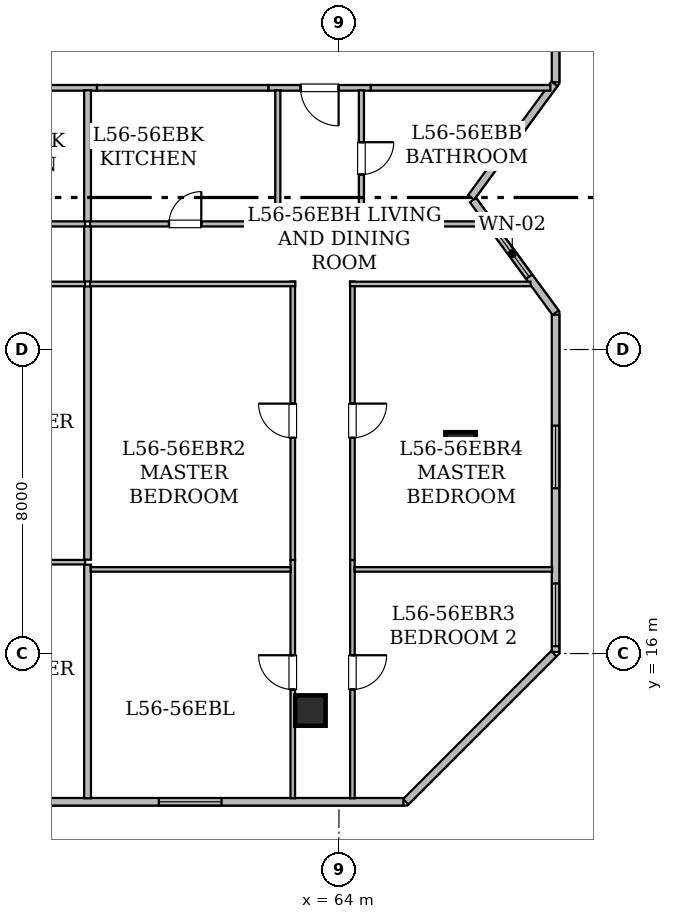
"""IFC4 building model, lengths in metres.
Left out: names, types, materials, properties, quantities, classifications, styles, units other than length and angle.
Written with IfcOpenShell. Run it as: python <this file> out.ifc"""

import sys

from ifc_helpers import new_model, si_unit, direction, frame, frame_2d, origin, origin_2d, place, context, subcontext, project, spatial, rectangle, hollow_rectangle, extrude, element, fill, save


model = new_model("IFC4")
c1 = context("Model", 3, precision=1e-05, world=origin(), true_north=direction((0.0, 1.0)))
c2 = subcontext(c1, "Body", "Model", "MODEL_VIEW")
j1 = project(units=[si_unit("LENGTHUNIT", "METRE"), si_unit("PLANEANGLEUNIT", "RADIAN")], contexts=[c1])
p1 = place(None, origin())
s1 = spatial("IfcSite", under=j1, at=p1, CompositionType="ELEMENT")
p2 = place(p1, origin())
s2 = spatial("IfcBuilding", under=s1, at=p2, CompositionType="ELEMENT")
p3 = place(p2, frame((0.0, 0.0, 220.85)))
s3 = spatial("IfcBuildingStorey", under=s2, at=p3, CompositionType="ELEMENT", Elevation=220.85)
for number, where, z_axis, x_axis in (
    (1, (63.25, 14.5, 0.0), (0.0, 0.0, 1.0), (1.0, 0.0, 0.0)),
    (2, (67.2, 21.425, 0.0), (0.0, 0.0, 1.0), (1.0, 0.0, 0.0)),
):
    element("IfcColumn", number, at=place(p3, frame(where, z_axis=z_axis, x_axis=x_axis)), inside=s3, PredefinedType="COLUMN", context=c2, shape_type="SweptSolid", body=[
        extrude(hollow_rectangle(XDim=0.8, YDim=0.8, WallThickness=0.04, at=origin_2d()), origin(), (0.0, 0.0, 1.0), 3.65),
    ])
p4 = place(p3, frame((69.7, 39.896, 0.0), z_axis=(0.0, 0.0, 1.0), x_axis=(0.0, -1.0, 0.0)))
e3 = element("IfcWall", 3, at=p4, inside=s3, PredefinedType="STANDARD", context=c2, shape_type="SweptSolid", body=[
    extrude(rectangle(XDim=8.863, YDim=0.2, at=frame_2d((4.432, 0.0))), origin(), (0.0, 0.0, 1.0), 3.43),
])
p5 = place(p4, frame((4.641, 0.0, 0.85)))
e4 = element("IfcOpeningElement", 4, at=p5, cuts=e3, PredefinedType="OPENING", context=c2, shape_type="SweptSolid", body=[
    extrude(rectangle(XDim=1.65, YDim=1.55, at=frame_2d((0.825, 0.775))), frame((0.0, 0.11, 0.0), z_axis=(0.0, -1.0, 0.0), x_axis=(1.0, 0.0, 0.0)), (0.0, 0.0, 1.0), 0.22),
])
p6 = place(p4, frame((2.811, 0.0, 0.8)))
e5 = element("IfcOpeningElement", 5, at=p6, cuts=e3, PredefinedType="OPENING", context=c2, shape_type="SweptSolid", body=[
    extrude(rectangle(XDim=1.2, YDim=1.5, at=frame_2d((0.6, 0.75))), frame((0.0, 0.11, 0.0), z_axis=(0.0, -1.0, 0.0), x_axis=(1.0, 0.0, 0.0)), (0.0, 0.0, 1.0), 0.22),
])
p7 = place(p4, frame((0.628, 0.0, 0.85)))
e6 = element("IfcOpeningElement", 6, at=p7, cuts=e3, PredefinedType="OPENING", context=c2, shape_type="SweptSolid", body=[
    extrude(rectangle(XDim=1.65, YDim=1.55, at=frame_2d((0.825, 0.775))), frame((0.0, 0.11, 0.0), z_axis=(0.0, -1.0, 0.0), x_axis=(1.0, 0.0, 0.0)), (0.0, 0.0, 1.0), 0.22),
])
p8 = place(p3, frame((69.67, 30.992, 0.0), z_axis=(0.0, 0.0, 1.0), x_axis=(-0.591320870733, -0.806436375566, 0.0)))
e7 = element("IfcWall", 7, at=p8, inside=s3, PredefinedType="STANDARD", context=c2, shape_type="SweptSolid", body=[
    extrude(rectangle(XDim=3.71, YDim=0.2, at=frame_2d((1.855, 0.0))), origin(), (0.0, 0.0, 1.0), 3.43),
])
p9 = place(p3, frame((67.527, 27.931, 0.0), z_axis=(0.0, 0.0, 1.0), x_axis=(0.591248456881, -0.80648946815, 0.0)))
e8 = element("IfcWall", 8, at=p9, inside=s3, PredefinedType="STANDARD", context=c2, shape_type="SweptSolid", body=[
    extrude(rectangle(XDim=3.675, YDim=0.2, at=frame_2d((1.837, 0.0))), origin(), (0.0, 0.0, 1.0), 3.43),
])
p10 = place(p9, frame((0.998, 0.0, 0.85)))
e9 = element("IfcOpeningElement", 9, at=p10, cuts=e8, PredefinedType="OPENING", context=c2, shape_type="SweptSolid", body=[
    extrude(rectangle(XDim=1.5, YDim=1.6, at=frame_2d((0.75, 0.8))), frame((0.0, 0.11, 0.0), z_axis=(0.0, -1.0, 0.0), x_axis=(1.0, 0.0, 0.0)), (0.0, 0.0, 1.0), 0.22),
])
p11 = place(p3, frame((69.7, 24.916, 0.0), z_axis=(0.0, 0.0, 1.0), x_axis=(0.0, -1.0, 0.0)))
e10 = element("IfcWall", 10, at=p11, inside=s3, PredefinedType="STANDARD", context=c2, shape_type="SweptSolid", body=[
    extrude(rectangle(XDim=8.875, YDim=0.2, at=frame_2d((4.438, 0.0))), origin(), (0.0, 0.0, 1.0), 3.43),
])
p12 = place(p11, frame((7.071, 0.0, 0.85)))
e11 = element("IfcOpeningElement", 11, at=p12, cuts=e10, PredefinedType="OPENING", context=c2, shape_type="SweptSolid", body=[
    extrude(rectangle(XDim=1.65, YDim=1.55, at=frame_2d((0.825, 0.775))), frame((0.0, 0.11, 0.0), z_axis=(0.0, -1.0, 0.0), x_axis=(1.0, 0.0, 0.0)), (0.0, 0.0, 1.0), 0.22),
])
p13 = place(p11, frame((2.918, 0.0, 0.85)))
e12 = element("IfcOpeningElement", 12, at=p13, cuts=e10, PredefinedType="OPENING", context=c2, shape_type="SweptSolid", body=[
    extrude(rectangle(XDim=1.65, YDim=1.55, at=frame_2d((0.825, 0.775))), frame((0.0, 0.11, 0.0), z_axis=(0.0, -1.0, 0.0), x_axis=(1.0, 0.0, 0.0)), (0.0, 0.0, 1.0), 0.22),
])
p14 = place(p3, frame((69.655, 15.996, 0.0), z_axis=(0.0, 0.0, 1.0), x_axis=(-0.707106781187, -0.707106781187, 0.0)))
e13 = element("IfcWall", 13, at=p14, inside=s3, PredefinedType="STANDARD", context=c2, shape_type="SweptSolid", body=[
    extrude(rectangle(XDim=5.51, YDim=0.2, at=frame_2d((2.755, 0.0))), origin(), (0.0, 0.0, 1.0), 3.43),
])
p15 = place(p3, frame((65.696, 12.1, 0.0), z_axis=(0.0, 0.0, 1.0), x_axis=(-1.0, 0.0, 0.0)))
e14 = element("IfcWall", 14, at=p15, inside=s3, PredefinedType="STANDARD", context=c2, shape_type="SweptSolid", body=[
    extrude(rectangle(XDim=41.393, YDim=0.2, at=frame_2d((20.697, 0.0))), origin(), (0.0, 0.0, 1.0), 3.43),
])
p16 = place(p15, frame((34.521, 0.0, 0.85)))
e15 = element("IfcOpeningElement", 15, at=p16, cuts=e14, PredefinedType="OPENING", context=c2, shape_type="SweptSolid", body=[
    extrude(rectangle(XDim=1.65, YDim=1.55, at=frame_2d((0.825, 0.775))), frame((0.0, 0.11, 0.0), z_axis=(0.0, -1.0, 0.0), x_axis=(1.0, 0.0, 0.0)), (0.0, 0.0, 1.0), 0.22),
])
p17 = place(p15, frame((39.14, 0.0, 0.85)))
e16 = element("IfcOpeningElement", 16, at=p17, cuts=e14, PredefinedType="OPENING", context=c2, shape_type="SweptSolid", body=[
    extrude(rectangle(XDim=1.65, YDim=1.55, at=frame_2d((0.825, 0.775))), frame((0.0, 0.11, 0.0), z_axis=(0.0, -1.0, 0.0), x_axis=(1.0, 0.0, 0.0)), (0.0, 0.0, 1.0), 0.22),
])
p18 = place(p15, frame((15.596, 0.0, 0.8)))
e17 = element("IfcOpeningElement", 17, at=p18, cuts=e14, PredefinedType="OPENING", context=c2, shape_type="SweptSolid", body=[
    extrude(rectangle(XDim=1.2, YDim=1.5, at=frame_2d((0.6, 0.75))), frame((0.0, 0.11, 0.0), z_axis=(0.0, -1.0, 0.0), x_axis=(1.0, 0.0, 0.0)), (0.0, 0.0, 1.0), 0.22),
])
p19 = place(p15, frame((19.706, 0.0, 0.85)))
e18 = element("IfcOpeningElement", 18, at=p19, cuts=e14, PredefinedType="OPENING", context=c2, shape_type="SweptSolid", body=[
    extrude(rectangle(XDim=1.65, YDim=1.55, at=frame_2d((0.825, 0.775))), frame((0.0, 0.11, 0.0), z_axis=(0.0, -1.0, 0.0), x_axis=(1.0, 0.0, 0.0)), (0.0, 0.0, 1.0), 0.22),
])
p20 = place(p15, frame((11.036, 0.0, 0.85)))
e19 = element("IfcOpeningElement", 19, at=p20, cuts=e14, PredefinedType="OPENING", context=c2, shape_type="SweptSolid", body=[
    extrude(rectangle(XDim=1.65, YDim=1.55, at=frame_2d((0.825, 0.775))), frame((0.0, 0.11, 0.0), z_axis=(0.0, -1.0, 0.0), x_axis=(1.0, 0.0, 0.0)), (0.0, 0.0, 1.0), 0.22),
])
p21 = place(p15, frame((4.786, 0.0, 0.85)))
e20 = element("IfcOpeningElement", 20, at=p21, cuts=e14, PredefinedType="OPENING", context=c2, shape_type="SweptSolid", body=[
    extrude(rectangle(XDim=1.65, YDim=1.55, at=frame_2d((0.825, 0.775))), frame((0.0, 0.11, 0.0), z_axis=(0.0, -1.0, 0.0), x_axis=(1.0, 0.0, 0.0)), (0.0, 0.0, 1.0), 0.22),
])
p22 = place(p3, frame((57.634, 30.885, 0.0), z_axis=(0.0, 0.0, 1.0), x_axis=(-1.0, 0.0, 0.0)))
e21 = element("IfcWall", 21, at=p22, inside=s3, PredefinedType="STANDARD", context=c2, shape_type="SweptSolid", body=[
    extrude(rectangle(XDim=7.935, YDim=0.15, at=frame_2d((3.968, 0.0))), origin(), (0.0, 0.0, 1.0), 2.725),
])
p23 = place(p3, frame((64.84, 30.885, 0.0), z_axis=(0.0, 0.0, 1.0), x_axis=(-1.0, 0.0, 0.0)))
e22 = element("IfcWall", 22, at=p23, inside=s3, PredefinedType="STANDARD", context=c2, shape_type="SweptSolid", body=[
    extrude(rectangle(XDim=2.698, YDim=0.15, at=frame_2d((1.349, 0.0))), origin(), (0.0, 0.0, 1.0), 3.43),
])
p24 = place(p23, frame((0.849, 0.0, 0.0)))
e23 = element("IfcOpeningElement", 23, at=p24, cuts=e22, PredefinedType="OPENING", context=c2, shape_type="SweptSolid", body=[
    extrude(rectangle(XDim=1.0, YDim=2.15, at=frame_2d((0.5, 1.075))), frame((0.0, 0.085, 0.0), z_axis=(0.0, -1.0, 0.0), x_axis=(1.0, 0.0, 0.0)), (0.0, 0.0, 1.0), 0.17),
])
p25 = place(p3, frame((69.564, 30.885, 0.0), z_axis=(0.0, 0.0, 1.0), x_axis=(-1.0, 0.0, 0.0)))
e24 = element("IfcWall", 24, at=p25, inside=s3, PredefinedType="STANDARD", context=c2, shape_type="SweptSolid", body=[
    extrude(rectangle(XDim=4.724, YDim=0.15, at=frame_2d((2.362, 0.0))), origin(), (0.0, 0.0, 1.0), 2.887),
])
p26 = place(p3, frame((62.142, 30.885, 0.0), z_axis=(0.0, 0.0, 1.0), x_axis=(-1.0, 0.0, 0.0)))
e25 = element("IfcWall", 25, at=p26, inside=s3, PredefinedType="STANDARD", context=c2, shape_type="SweptSolid", body=[
    extrude(rectangle(XDim=4.508, YDim=0.15, at=frame_2d((2.254, 0.0))), origin(), (0.0, 0.0, 1.0), 3.43),
])
p27 = place(p3, frame((49.385, 27.305, 0.0), z_axis=(0.0, 0.0, 1.0), x_axis=(1.0, 0.0, 0.0)))
e26 = element("IfcWall", 26, at=p27, inside=s3, PredefinedType="PARTITIONING", context=c2, shape_type="SweptSolid", body=[
    extrude(rectangle(XDim=7.935, YDim=0.135, at=frame_2d((3.968, 0.0))), origin(), (0.0, 0.0, 1.0), 2.725),
])
p28 = place(p27, frame((3.542, 0.0, 0.0)))
e27 = element("IfcOpeningElement", 27, at=p28, cuts=e26, PredefinedType="OPENING", context=c2, shape_type="SweptSolid", body=[
    extrude(rectangle(XDim=0.85, YDim=2.1, at=frame_2d((0.425, 1.05))), frame((0.0, 0.077, 0.0), z_axis=(0.0, -1.0, 0.0), x_axis=(1.0, 0.0, 0.0)), (0.0, 0.0, 1.0), 0.155),
])
p29 = place(p3, frame((57.32, 25.725, 0.0), z_axis=(0.0, 0.0, 1.0), x_axis=(-1.0, 0.0, 0.0)))
e28 = element("IfcWall", 28, at=p29, inside=s3, PredefinedType="PARTITIONING", context=c2, shape_type="SweptSolid", body=[
    extrude(rectangle(XDim=7.1, YDim=0.12, at=frame_2d((3.55, 0.0))), origin(), (0.0, 0.0, 1.0), 2.725),
])
p30 = place(p3, frame((57.385, 27.24, 0.0), z_axis=(0.0, 0.0, 1.0), x_axis=(0.0, -1.0, 0.0)))
e29 = element("IfcWall", 29, at=p30, inside=s3, PredefinedType="STANDARD", context=c2, shape_type="SweptSolid", body=[
    extrude(rectangle(XDim=1.45, YDim=0.18, at=frame_2d((0.725, 0.0))), origin(), (0.0, 0.0, 1.0), 3.43),
])
p31 = place(p3, frame((57.385, 30.82, 0.0), z_axis=(0.0, 0.0, 1.0), x_axis=(0.0, -1.0, 0.0)))
e30 = element("IfcWall", 30, at=p31, inside=s3, PredefinedType="STANDARD", context=c2, shape_type="SweptSolid", body=[
    extrude(rectangle(XDim=3.45, YDim=0.18, at=frame_2d((1.725, 0.0))), origin(), (0.0, 0.0, 1.0), 3.43),
])
p32 = place(p3, frame((50.339, 18.404, 0.0), z_axis=(0.0, 0.0, 1.0), x_axis=(1.0, 0.0, 0.0)))
e31 = element("IfcWall", 31, at=p32, inside=s3, PredefinedType="PARTITIONING", context=c2, shape_type="SweptSolid", body=[
    extrude(rectangle(XDim=6.981, YDim=0.12, at=frame_2d((3.49, 0.0))), origin(), (0.0, 0.0, 1.0), 2.725),
])
p33 = place(p3, frame((57.385, 18.339, 0.0), z_axis=(0.0, 0.0, 1.0), x_axis=(0.0, -1.0, 0.0)))
e32 = element("IfcWall", 32, at=p33, inside=s3, PredefinedType="STANDARD", context=c2, shape_type="SweptSolid", body=[
    extrude(rectangle(XDim=6.147, YDim=0.18, at=frame_2d((3.074, 0.0))), origin(), (0.0, 0.0, 1.0), 2.725),
])
p34 = place(p3, frame((57.385, 25.66, 0.0), z_axis=(0.0, 0.0, 1.0), x_axis=(0.0, -1.0, 0.0)))
e33 = element("IfcWall", 33, at=p34, inside=s3, PredefinedType="STANDARD", context=c2, shape_type="SweptSolid", body=[
    extrude(rectangle(XDim=7.191, YDim=0.18, at=frame_2d((3.595, 0.0))), origin(), (0.0, 0.0, 1.0), 2.725),
])
p35 = place(p3, frame((64.591, 30.82, 0.0), z_axis=(0.0, 0.0, 1.0), x_axis=(0.0, -1.0, 0.0)))
e34 = element("IfcWall", 34, at=p35, inside=s3, PredefinedType="PARTITIONING", context=c2, shape_type="SweptSolid", body=[
    extrude(rectangle(XDim=3.58, YDim=0.135, at=frame_2d((1.79, 0.0))), origin(), (0.0, 0.0, 1.0), 3.43),
])
p36 = place(p35, frame((1.365, 0.0, 0.0)))
e35 = element("IfcOpeningElement", 35, at=p36, cuts=e34, PredefinedType="OPENING", context=c2, shape_type="SweptSolid", body=[
    extrude(rectangle(XDim=0.85, YDim=2.1, at=frame_2d((0.425, 1.05))), frame((0.0, 0.077, 0.0), z_axis=(0.0, -1.0, 0.0), x_axis=(1.0, 0.0, 0.0)), (0.0, 0.0, 1.0), 0.155),
])
p37 = place(p3, frame((64.526, 27.305, 0.0), z_axis=(0.0, 0.0, 1.0), x_axis=(1.0, 0.0, 0.0)))
e36 = element("IfcWall", 36, at=p37, inside=s3, PredefinedType="PARTITIONING", context=c2, shape_type="SweptSolid", body=[
    extrude(rectangle(XDim=3.431, YDim=0.135, at=frame_2d((1.716, 0.0))), origin(), (0.0, 0.0, 1.0), 2.887),
])
p38 = place(p3, frame((57.45, 27.305, 0.0), z_axis=(0.0, 0.0, 1.0), x_axis=(1.0, 0.0, 0.0)))
e37 = element("IfcWall", 37, at=p38, inside=s3, PredefinedType="PARTITIONING", context=c2, shape_type="SweptSolid", body=[
    extrude(rectangle(XDim=5.006, YDim=0.135, at=frame_2d((2.503, 0.0))), origin(), (0.0, 0.0, 1.0), 3.43),
])
p39 = place(p38, frame((2.078, 0.0, 0.0)))
e38 = element("IfcOpeningElement", 38, at=p39, cuts=e37, PredefinedType="OPENING", context=c2, shape_type="SweptSolid", body=[
    extrude(rectangle(XDim=0.85, YDim=2.1, at=frame_2d((0.425, 1.05))), frame((0.0, 0.077, 0.0), z_axis=(0.0, -1.0, 0.0), x_axis=(1.0, 0.0, 0.0)), (0.0, 0.0, 1.0), 0.155),
])
p40 = place(p3, frame((62.391, 27.24, 0.0), z_axis=(0.0, 0.0, 1.0), x_axis=(0.0, 1.0, 0.0)))
e39 = element("IfcWall", 39, at=p40, inside=s3, PredefinedType="PARTITIONING", context=c2, shape_type="SweptSolid", body=[
    extrude(rectangle(XDim=3.58, YDim=0.135, at=frame_2d((1.79, 0.0))), origin(), (0.0, 0.0, 1.0), 3.43),
])
p41 = place(p3, frame((62.785, 12.192, 0.0), z_axis=(0.0, 0.0, 1.0), x_axis=(0.0, 1.0, 0.0)))
e40 = element("IfcWall", 40, at=p41, inside=s3, PredefinedType="PARTITIONING", context=c2, shape_type="SweptSolid", body=[
    extrude(rectangle(XDim=6.271, YDim=0.12, at=frame_2d((3.135, 0.0))), origin(), (0.0, 0.0, 1.0), 2.725),
])
p42 = place(p41, frame((2.864, 0.0, 0.0)))
e41 = element("IfcOpeningElement", 41, at=p42, cuts=e40, PredefinedType="OPENING", context=c2, shape_type="SweptSolid", body=[
    extrude(rectangle(XDim=0.9, YDim=2.1, at=frame_2d((0.45, 1.05))), frame((0.0, 0.07, 0.0), z_axis=(0.0, -1.0, 0.0), x_axis=(1.0, 0.0, 0.0)), (0.0, 0.0, 1.0), 0.14),
])
p43 = place(p3, frame((62.785, 18.463, 0.0), z_axis=(0.0, 0.0, 1.0), x_axis=(0.0, 1.0, 0.0)))
e42 = element("IfcWall", 42, at=p43, inside=s3, PredefinedType="PARTITIONING", context=c2, shape_type="SweptSolid", body=[
    extrude(rectangle(XDim=7.327, YDim=0.12, at=frame_2d((3.664, 0.0))), origin(), (0.0, 0.0, 1.0), 2.725),
])
p44 = place(p43, frame((3.213, 0.0, 0.0)))
e43 = element("IfcOpeningElement", 43, at=p44, cuts=e42, PredefinedType="OPENING", context=c2, shape_type="SweptSolid", body=[
    extrude(rectangle(XDim=0.9, YDim=2.1, at=frame_2d((0.45, 1.05))), frame((0.0, 0.07, 0.0), z_axis=(0.0, -1.0, 0.0), x_axis=(1.0, 0.0, 0.0)), (0.0, 0.0, 1.0), 0.14),
])
p45 = place(p3, frame((62.85, 25.725, 0.0), z_axis=(0.0, 0.0, 1.0), x_axis=(-1.0, 0.0, 0.0)))
e44 = element("IfcWall", 44, at=p45, inside=s3, PredefinedType="PARTITIONING", context=c2, shape_type="SweptSolid", body=[
    extrude(rectangle(XDim=5.4, YDim=0.12, at=frame_2d((2.7, 0.0))), origin(), (0.0, 0.0, 1.0), 3.43),
])
p46 = place(p3, frame((64.355, 18.463, 0.0), z_axis=(0.0, 0.0, 1.0), x_axis=(0.0, -1.0, 0.0)))
e45 = element("IfcWall", 45, at=p46, inside=s3, PredefinedType="PARTITIONING", context=c2, shape_type="SweptSolid", body=[
    extrude(rectangle(XDim=6.271, YDim=0.12, at=frame_2d((3.135, 0.0))), origin(), (0.0, 0.0, 1.0), 2.887),
])
p47 = place(p46, frame((2.507, 0.0, 0.0)))
e46 = element("IfcOpeningElement", 46, at=p47, cuts=e45, PredefinedType="OPENING", context=c2, shape_type="SweptSolid", body=[
    extrude(rectangle(XDim=0.9, YDim=2.1, at=frame_2d((0.45, 1.05))), frame((0.0, 0.07, 0.0), z_axis=(0.0, -1.0, 0.0), x_axis=(1.0, 0.0, 0.0)), (0.0, 0.0, 1.0), 0.14),
])
p48 = place(p3, frame((64.355, 25.79, 0.0), z_axis=(0.0, 0.0, 1.0), x_axis=(0.0, -1.0, 0.0)))
e47 = element("IfcWall", 47, at=p48, inside=s3, PredefinedType="PARTITIONING", context=c2, shape_type="SweptSolid", body=[
    extrude(rectangle(XDim=7.327, YDim=0.12, at=frame_2d((3.664, 0.0))), origin(), (0.0, 0.0, 1.0), 2.725),
])
p49 = place(p48, frame((3.213, 0.0, 0.0)))
e48 = element("IfcOpeningElement", 48, at=p49, cuts=e47, PredefinedType="OPENING", context=c2, shape_type="SweptSolid", body=[
    extrude(rectangle(XDim=0.9, YDim=2.1, at=frame_2d((0.45, 1.05))), frame((0.0, 0.07, 0.0), z_axis=(0.0, -1.0, 0.0), x_axis=(1.0, 0.0, 0.0)), (0.0, 0.0, 1.0), 0.14),
])
p50 = place(p3, frame((69.041, 25.725, 0.0), z_axis=(0.0, 0.0, 1.0), x_axis=(-1.0, 0.0, 0.0)))
e49 = element("IfcWall", 49, at=p50, inside=s3, PredefinedType="PARTITIONING", context=c2, shape_type="SweptSolid", body=[
    extrude(rectangle(XDim=4.751, YDim=0.12, at=frame_2d((2.375, 0.0))), origin(), (0.0, 0.0, 1.0), 2.887),
])
p51 = place(p3, frame((57.467, 18.214, 0.0), z_axis=(0.0, 0.0, 1.0), x_axis=(1.0, 0.0, 0.0)))
e50 = element("IfcWall", 50, at=p51, inside=s3, PredefinedType="PARTITIONING", context=c2, shape_type="SweptSolid", body=[
    extrude(rectangle(XDim=5.264, YDim=0.12, at=frame_2d((2.632, 0.0))), origin(), (0.0, 0.0, 1.0), 3.43),
])
p52 = place(p3, frame((64.409, 18.214, 0.0), z_axis=(0.0, 0.0, 1.0), x_axis=(1.0, 0.0, 0.0)))
e51 = element("IfcWall", 51, at=p52, inside=s3, PredefinedType="PARTITIONING", context=c2, shape_type="SweptSolid", body=[
    extrude(rectangle(XDim=5.199, YDim=0.12, at=frame_2d((2.6, 0.0))), origin(), (0.0, 0.0, 1.0), 2.887),
])
p53 = place(p10, origin())
e52 = element("IfcWindow", 52, at=p53, inside=s3, PartitioningType="SINGLE_PANEL", PredefinedType="WINDOW", context=c2, shape_type="SweptSolid", body=[
    extrude(rectangle(XDim=1.5, YDim=1.6, at=frame_2d((0.75, 0.8))), frame((0.0, 0.03, 0.0), z_axis=(0.0, -1.0, 0.0), x_axis=(1.0, 0.0, 0.0)), (0.0, 0.0, 1.0), 0.06),
])
fill(e9, e52)
p54 = place(p21, origin())
e53 = element("IfcWindow", 53, at=p54, inside=s3, PartitioningType="SINGLE_PANEL", PredefinedType="WINDOW", context=c2, shape_type="SweptSolid", body=[
    extrude(rectangle(XDim=1.65, YDim=1.55, at=frame_2d((0.825, 0.775))), frame((0.0, 0.03, 0.0), z_axis=(0.0, -1.0, 0.0), x_axis=(1.0, 0.0, 0.0)), (0.0, 0.0, 1.0), 0.06),
])
fill(e20, e53)
p55 = place(p12, origin())
e54 = element("IfcWindow", 54, at=p55, inside=s3, PartitioningType="SINGLE_PANEL", PredefinedType="WINDOW", context=c2, shape_type="SweptSolid", body=[
    extrude(rectangle(XDim=1.65, YDim=1.55, at=frame_2d((0.825, 0.775))), frame((0.0, 0.03, 0.0), z_axis=(0.0, -1.0, 0.0), x_axis=(1.0, 0.0, 0.0)), (0.0, 0.0, 1.0), 0.06),
])
fill(e11, e54)
p56 = place(p13, origin())
e55 = element("IfcWindow", 55, at=p56, inside=s3, PartitioningType="SINGLE_PANEL", PredefinedType="WINDOW", context=c2, shape_type="SweptSolid", body=[
    extrude(rectangle(XDim=1.65, YDim=1.55, at=frame_2d((0.825, 0.775))), frame((0.0, 0.03, 0.0), z_axis=(0.0, -1.0, 0.0), x_axis=(1.0, 0.0, 0.0)), (0.0, 0.0, 1.0), 0.06),
])
fill(e12, e55)
p57 = place(p24, origin())
e56 = element("IfcDoor", 56, at=p57, inside=s3, OperationType="SINGLE_SWING_LEFT", PredefinedType="DOOR", context=c2, shape_type="SweptSolid", body=[
    extrude(rectangle(XDim=1.0, YDim=2.15, at=frame_2d((0.5, 1.075))), frame((0.0, 0.025, 0.0), z_axis=(0.0, -1.0, 0.0), x_axis=(1.0, 0.0, 0.0)), (0.0, 0.0, 1.0), 0.05),
])
fill(e23, e56)
p58 = place(p36, origin())
e57 = element("IfcDoor", 57, at=p58, inside=s3, OperationType="SINGLE_SWING_LEFT", PredefinedType="DOOR", context=c2, shape_type="SweptSolid", body=[
    extrude(rectangle(XDim=0.85, YDim=2.1, at=frame_2d((0.425, 1.05))), frame((0.0, 0.025, 0.0), z_axis=(0.0, -1.0, 0.0), x_axis=(1.0, 0.0, 0.0)), (0.0, 0.0, 1.0), 0.05),
])
fill(e35, e57)
p59 = place(p39, origin())
e58 = element("IfcDoor", 58, at=p59, inside=s3, OperationType="SINGLE_SWING_RIGHT", PredefinedType="DOOR", context=c2, shape_type="SweptSolid", body=[
    extrude(rectangle(XDim=0.85, YDim=2.1, at=frame_2d((0.425, 1.05))), frame((0.0, 0.025, 0.0), z_axis=(0.0, -1.0, 0.0), x_axis=(1.0, 0.0, 0.0)), (0.0, 0.0, 1.0), 0.05),
])
fill(e38, e58)
p60 = place(p42, origin())
e59 = element("IfcDoor", 59, at=p60, inside=s3, OperationType="SINGLE_SWING_RIGHT", PredefinedType="DOOR", context=c2, shape_type="SweptSolid", body=[
    extrude(rectangle(XDim=0.9, YDim=2.1, at=frame_2d((0.45, 1.05))), frame((0.0, 0.025, 0.0), z_axis=(0.0, -1.0, 0.0), x_axis=(1.0, 0.0, 0.0)), (0.0, 0.0, 1.0), 0.05),
])
fill(e41, e59)
p61 = place(p44, origin())
e60 = element("IfcDoor", 60, at=p61, inside=s3, OperationType="SINGLE_SWING_RIGHT", PredefinedType="DOOR", context=c2, shape_type="SweptSolid", body=[
    extrude(rectangle(XDim=0.9, YDim=2.1, at=frame_2d((0.45, 1.05))), frame((0.0, 0.025, 0.0), z_axis=(0.0, -1.0, 0.0), x_axis=(1.0, 0.0, 0.0)), (0.0, 0.0, 1.0), 0.05),
])
fill(e43, e60)
p62 = place(p47, origin())
e61 = element("IfcDoor", 61, at=p62, inside=s3, OperationType="SINGLE_SWING_LEFT", PredefinedType="DOOR", context=c2, shape_type="SweptSolid", body=[
    extrude(rectangle(XDim=0.9, YDim=2.1, at=frame_2d((0.45, 1.05))), frame((0.0, 0.025, 0.0), z_axis=(0.0, -1.0, 0.0), x_axis=(1.0, 0.0, 0.0)), (0.0, 0.0, 1.0), 0.05),
])
fill(e46, e61)
p63 = place(p49, origin())
e62 = element("IfcDoor", 62, at=p63, inside=s3, OperationType="SINGLE_SWING_LEFT", PredefinedType="DOOR", context=c2, shape_type="SweptSolid", body=[
    extrude(rectangle(XDim=0.9, YDim=2.1, at=frame_2d((0.45, 1.05))), frame((0.0, 0.025, 0.0), z_axis=(0.0, -1.0, 0.0), x_axis=(1.0, 0.0, 0.0)), (0.0, 0.0, 1.0), 0.05),
])
fill(e48, e62)
save(model, sys.argv[1])
